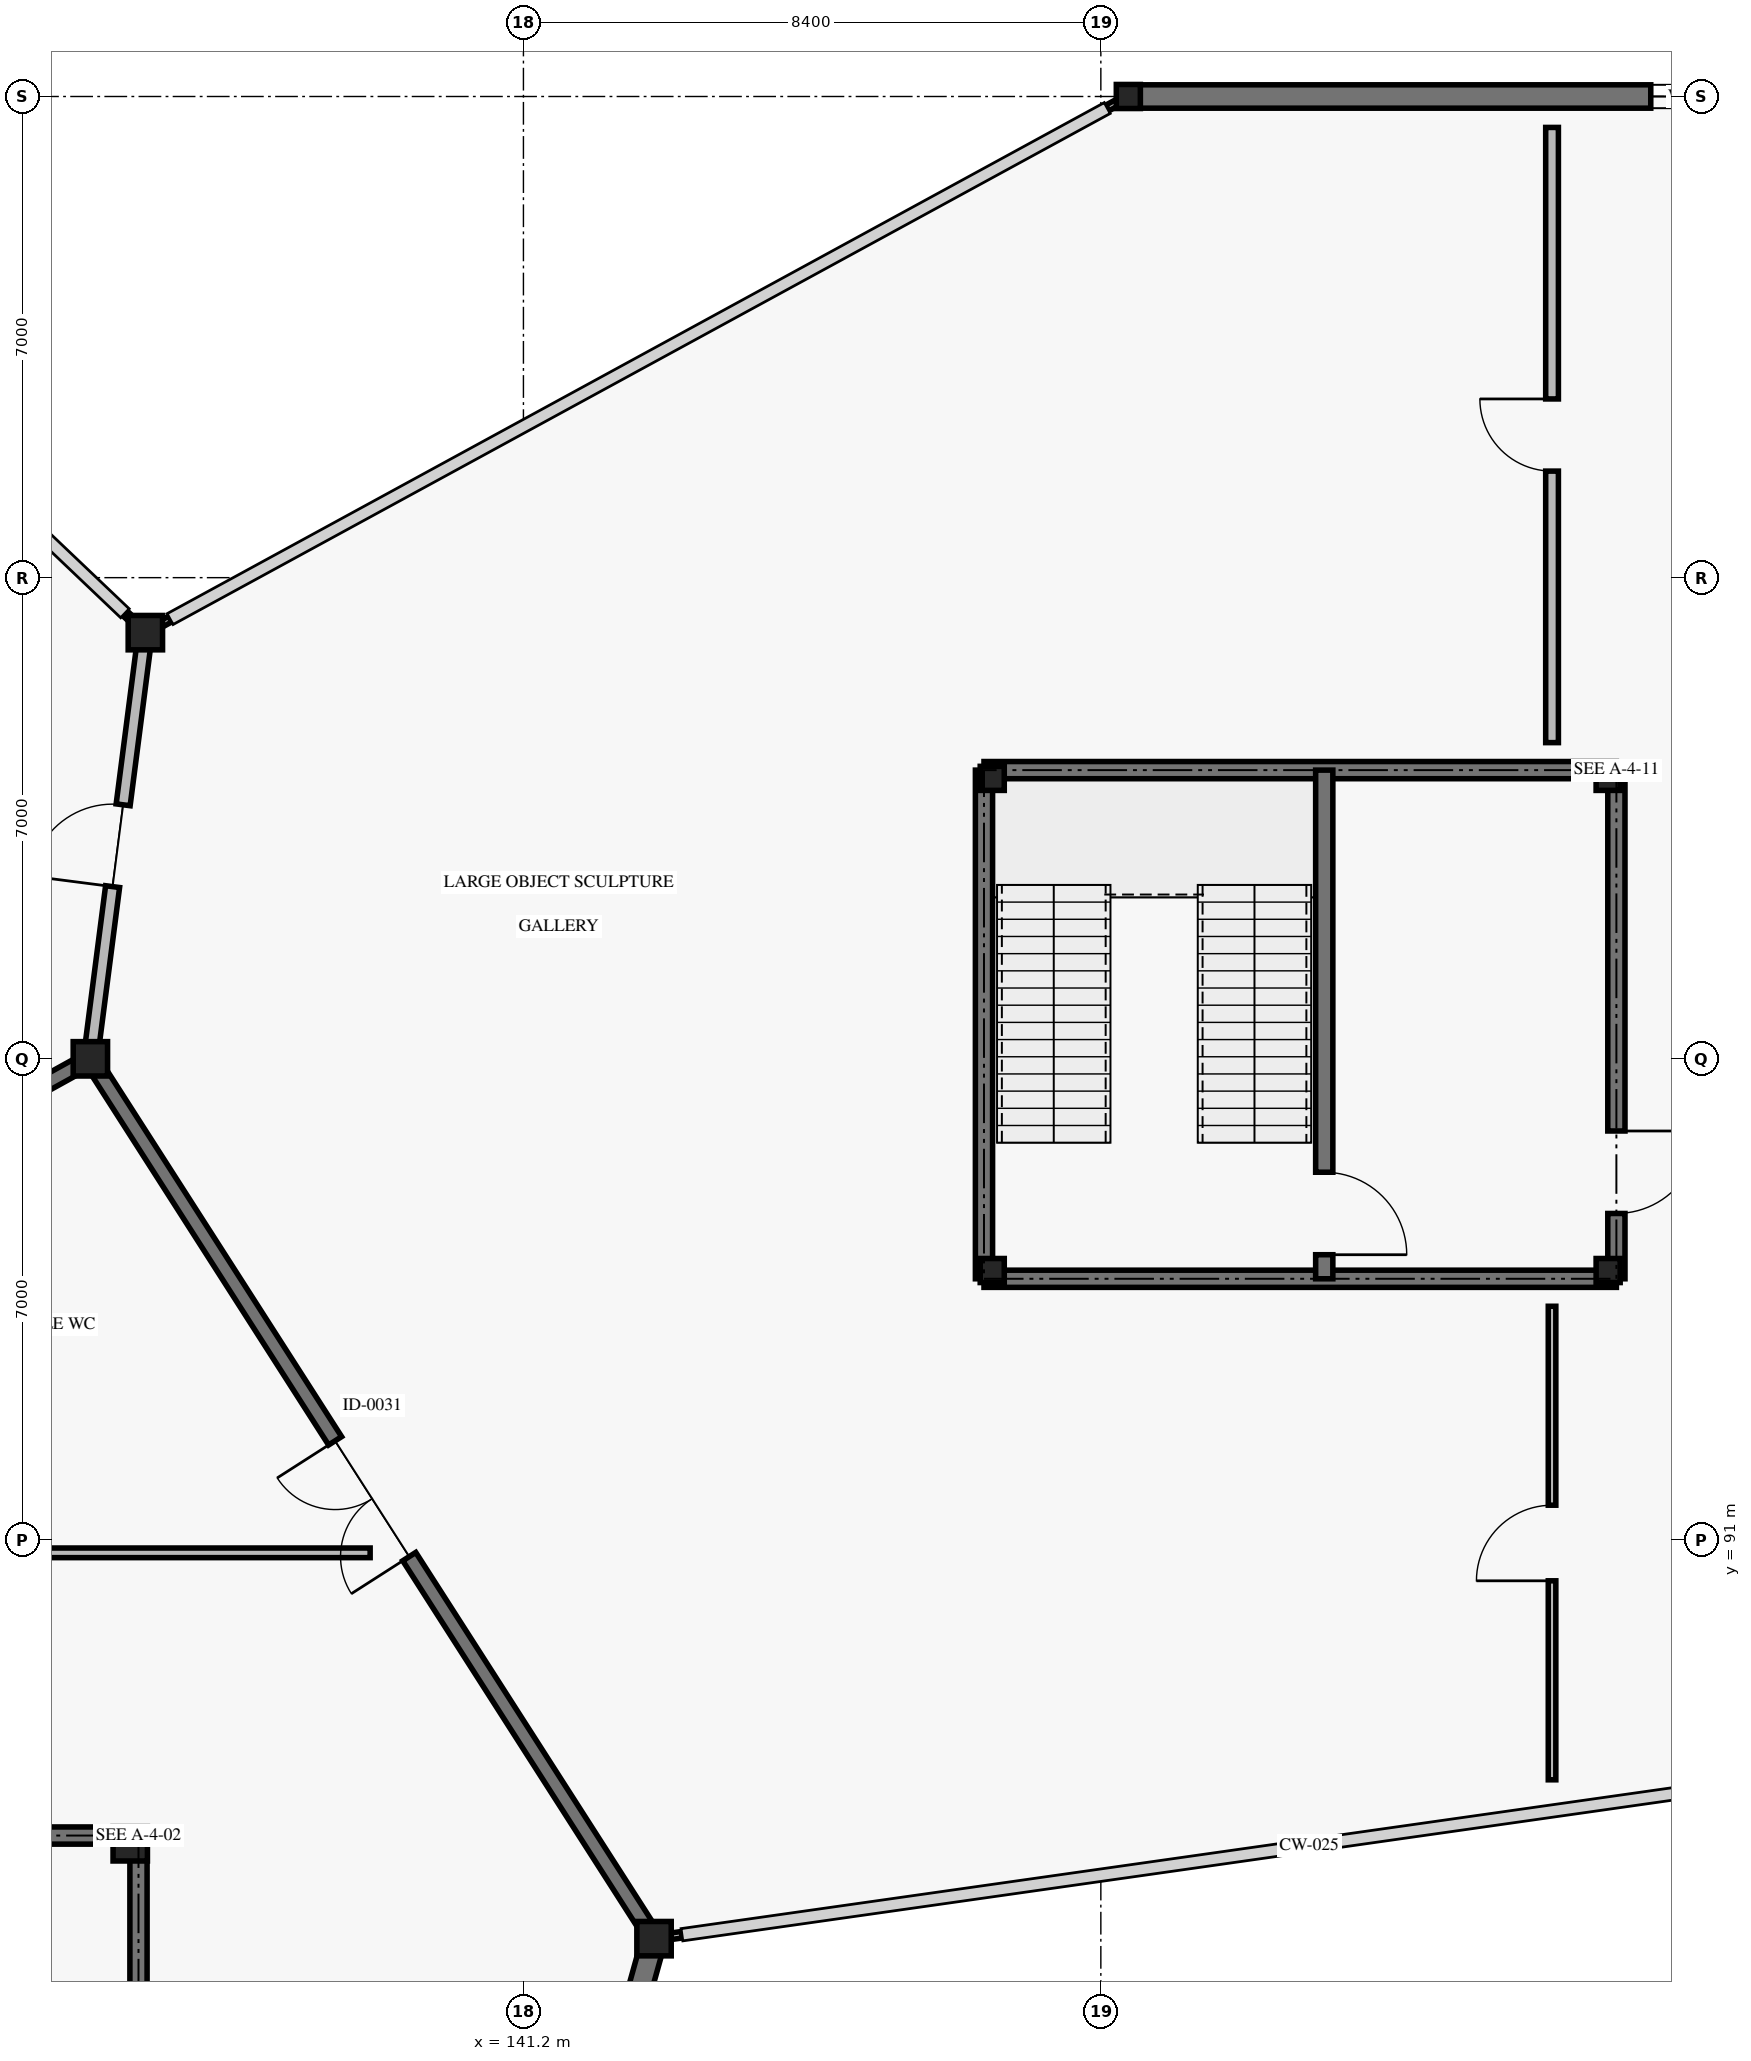
"""IFC4 building model, lengths in metres.
Left out: names, types, materials, properties, quantities, classifications, styles, units other than length and angle.
Written with IfcOpenShell. Run it as: python <this file> out.ifc"""

import sys

from ifc_helpers import new_model, si_unit, direction, frame, frame_2d, origin, origin_2d, place, context, subcontext, project, spatial, rectangle, i_section, extrude, element, fill, save


model = new_model("IFC4")
c1 = context("Model", 3, precision=1e-05, world=origin(), true_north=direction((0.0, 1.0)))
c2 = subcontext(c1, "Body", "Model", "MODEL_VIEW")
j1 = project(units=[si_unit("LENGTHUNIT", "METRE"), si_unit("PLANEANGLEUNIT", "RADIAN")], contexts=[c1])
p1 = place(None, origin())
s1 = spatial("IfcSite", under=j1, at=p1, CompositionType="ELEMENT")
p2 = place(p1, origin())
s2 = spatial("IfcBuilding", under=s1, at=p2, CompositionType="ELEMENT")
p3 = place(p2, origin())
s3 = spatial("IfcBuildingStorey", under=s2, at=p3, CompositionType="ELEMENT", Elevation=0.0)
for number, where, z_axis, x_axis in (
    (1, (134.9, 98.0, 0.0), (0.0, 0.0, 1.0), (1.0, 0.0, 0.0)),
    (2, (135.7, 104.2, 0.0), (0.0, 0.0, 1.0), (1.0, 0.0, 0.0)),
    (3, (143.1, 85.2, 0.0), (0.0, 0.0, 1.0), (1.0, 0.0, 0.0)),
):
    element("IfcColumn", number, at=place(p3, frame(where, z_axis=z_axis, x_axis=x_axis)), inside=s3, PredefinedType="COLUMN", context=c2, shape_type="SweptSolid", body=[
        extrude(i_section(OverallWidth=0.5, OverallDepth=0.5, WebThickness=0.022, FlangeThickness=0.036, at=origin_2d()), origin(), (0.0, 0.0, 1.0), 5.4),
    ])
p4 = place(p3, frame((150.0, 112.0, 0.0), z_axis=(0.0, 0.0, 1.0), x_axis=(1.0, 0.0, 0.0)))
e4 = element("IfcColumn", 4, at=p4, inside=s3, PredefinedType="COLUMN", context=c2, shape_type="SweptSolid", body=[
    extrude(i_section(OverallWidth=0.35, OverallDepth=0.35, WebThickness=0.02, FlangeThickness=0.028, at=origin_2d()), origin(), (0.0, 0.0, 1.0), 5.4),
])
p5 = place(p3, frame((135.48, 86.58, 0.0), z_axis=(0.0, 0.0, 1.0), x_axis=(1.0, 0.0, 0.0)))
e5 = element("IfcColumn", 5, at=p5, inside=s3, PredefinedType="COLUMN", context=c2, shape_type="SweptSolid", body=[
    extrude(i_section(OverallWidth=0.5, OverallDepth=0.5, WebThickness=0.022, FlangeThickness=0.036, at=origin_2d()), origin(), (0.0, 0.0, 1.0), 5.4),
])
for number, where, z_axis, x_axis in (
    (6, (148.02, 94.92, 0.0), (0.0, 0.0, 1.0), (1.0, 0.0, 0.0)),
    (7, (156.98, 94.92, 0.0), (0.0, 0.0, 1.0), (1.0, 0.0, 0.0)),
    (8, (156.98, 102.08, 0.0), (0.0, 0.0, 1.0), (1.0, 0.0, 0.0)),
    (9, (148.02, 102.08, 0.0), (0.0, 0.0, 1.0), (1.0, 0.0, 0.0)),
):
    element("IfcColumn", number, at=place(p3, frame(where, z_axis=z_axis, x_axis=x_axis)), inside=s3, PredefinedType="COLUMN", context=c2, shape_type="SweptSolid", body=[
        extrude(i_section(OverallWidth=0.35, OverallDepth=0.35, WebThickness=0.02, FlangeThickness=0.028, at=origin_2d()), origin(), (0.0, 0.0, 1.0), 5.4),
    ])
p6 = place(p3, frame((143.084, 85.142, 0.0), z_axis=(0.0, 0.0, 1.0), x_axis=(-0.268810029922, -0.963193214165, 0.0)))
e10 = element("IfcWall", 10, at=p6, inside=s3, PredefinedType="SOLIDWALL", context=c2, shape_type="SweptSolid", body=[
    extrude(rectangle(XDim=13.333, YDim=0.34, at=frame_2d((6.667, 0.0))), origin(), (0.0, 0.0, 1.0), 4.22),
])
p7 = place(p3, frame((135.403, 104.482, 0.0), z_axis=(0.0, 0.0, 1.0), x_axis=(0.726243974232, -0.687437044311, 0.0)))
e11 = element("IfcWall", 11, at=p7, inside=s3, PredefinedType="SOLIDWALL", context=c2, shape_type="SweptSolid", body=[
    extrude(rectangle(XDim=0.308, YDim=0.095, at=frame_2d((0.154, 0.0))), origin(), (0.0, 0.0, 1.0), 4.22),
])
p8 = place(p3, frame((143.506, 85.257, 0.0), z_axis=(0.0, 0.0, 1.0), x_axis=(-0.990232667812, -0.139424759628, 0.0)))
e12 = element("IfcWall", 12, at=p8, inside=s3, PredefinedType="SOLIDWALL", context=c2, shape_type="SweptSolid", body=[
    extrude(rectangle(XDim=0.308, YDim=0.095, at=frame_2d((0.154, 0.0))), origin(), (0.0, 0.0, 1.0), 4.22),
])
p9 = place(p3, frame((150.0, 112.0, 0.0), z_axis=(0.0, 0.0, 1.0), x_axis=(1.0, 0.0, 0.0)))
e13 = element("IfcWall", 13, at=p9, inside=s3, PredefinedType="SOLIDWALL", context=c2, shape_type="SweptSolid", body=[
    extrude(rectangle(XDim=16.4, YDim=0.34, at=frame_2d((8.2, 0.0))), origin(), (0.0, 0.0, 1.0), 4.22),
])
p10 = place(p9, frame((7.6, 0.0, 0.95)))
e14 = element("IfcOpeningElement", 14, at=p10, cuts=e13, PredefinedType="OPENING", context=c2, shape_type="SweptSolid", body=[
    extrude(rectangle(XDim=1.2, YDim=1.8, at=frame_2d((0.6, 0.9))), frame((0.0, 0.18, 0.0), z_axis=(0.0, -1.0, 0.0), x_axis=(1.0, 0.0, 0.0)), (0.0, 0.0, 1.0), 0.36),
])
p11 = place(p3, frame((135.79, 104.249, 0.0), z_axis=(0.0, 0.0, 1.0), x_axis=(0.876984894636, 0.480517944077, 0.0)))
e15 = element("IfcWall", 15, at=p11, inside=s3, PredefinedType="SOLIDWALL", context=c2, shape_type="SweptSolid", body=[
    extrude(rectangle(XDim=0.308, YDim=0.095, at=frame_2d((0.154, 0.0))), origin(), (0.0, 0.0, 1.0), 4.22),
])
p12 = place(p3, frame((149.693, 111.832, 0.0), z_axis=(0.0, 0.0, 1.0), x_axis=(0.876801617046, 0.480852289529, 0.0)))
e16 = element("IfcWall", 16, at=p12, inside=s3, PredefinedType="SOLIDWALL", context=c2, shape_type="SweptSolid", body=[
    extrude(rectangle(XDim=0.308, YDim=0.095, at=frame_2d((0.154, 0.0))), origin(), (0.0, 0.0, 1.0), 4.22),
])
p13 = place(p3, frame((134.9, 98.0, 0.0), z_axis=(0.0, 0.0, 1.0), x_axis=(-0.875181353329, -0.483794996652, 0.0)))
e17 = element("IfcWall", 17, at=p13, inside=s3, PredefinedType="SOLIDWALL", context=c2, shape_type="SweptSolid", body=[
    extrude(rectangle(XDim=18.396, YDim=0.225, at=frame_2d((9.198, 0.0))), origin(), (0.0, 0.0, 1.0), 4.62),
])
p14 = place(p13, frame((8.098, 0.0, 0.0)))
e18 = element("IfcOpeningElement", 18, at=p14, cuts=e17, PredefinedType="OPENING", context=c2, shape_type="SweptSolid", body=[
    extrude(rectangle(XDim=2.2, YDim=2.6, at=frame_2d((1.1, 1.3))), frame((0.0, 0.123, 0.0), z_axis=(0.0, -1.0, 0.0), x_axis=(1.0, 0.0, 0.0)), (0.0, 0.0, 1.0), 0.245),
])
p15 = place(p3, frame((143.1, 85.2, 0.0), z_axis=(0.0, 0.0, 1.0), x_axis=(-0.539434641352, 0.842027474439, 0.0)))
e19 = element("IfcWall", 19, at=p15, inside=s3, PredefinedType="SOLIDWALL", context=c2, shape_type="SweptSolid", body=[
    extrude(rectangle(XDim=15.201, YDim=0.225, at=frame_2d((7.601, 0.0))), origin(), (0.0, 0.0, 1.0), 4.62),
])
p16 = place(p15, frame((6.601, 0.0, 0.0)))
e20 = element("IfcOpeningElement", 20, at=p16, cuts=e19, PredefinedType="OPENING", context=c2, shape_type="SweptSolid", body=[
    extrude(rectangle(XDim=2.0, YDim=2.5, at=frame_2d((1.0, 1.25))), frame((0.0, 0.123, 0.0), z_axis=(0.0, -1.0, 0.0), x_axis=(1.0, 0.0, 0.0)), (0.0, 0.0, 1.0), 0.245),
])
p17 = place(p3, frame((134.9, 98.0, 0.0), z_axis=(0.0, 0.0, 1.0), x_axis=(0.127980011854, 0.991776747341, 0.0)))
e21 = element("IfcWall", 21, at=p17, inside=s3, PredefinedType="SOLIDWALL", context=c2, shape_type="SweptSolid", body=[
    extrude(rectangle(XDim=6.251, YDim=0.205, at=frame_2d((3.126, 0.0))), origin(), (0.0, 0.0, 1.0), 3.92),
])
p18 = place(p17, frame((2.526, 0.0, 0.0)))
e22 = element("IfcOpeningElement", 22, at=p18, cuts=e21, PredefinedType="OPENING", context=c2, shape_type="SweptSolid", body=[
    extrude(rectangle(XDim=1.2, YDim=2.2, at=frame_2d((0.6, 1.1))), frame((0.0, 0.113, 0.0), z_axis=(0.0, -1.0, 0.0), x_axis=(1.0, 0.0, 0.0)), (0.0, 0.0, 1.0), 0.225),
])
p19 = place(p3, frame((122.829, 90.813, 0.0), z_axis=(0.0, 0.0, 1.0), x_axis=(1.0, 0.0, 0.0)))
e23 = element("IfcWall", 23, at=p19, inside=s3, PredefinedType="PARTITIONING", context=c2, shape_type="SweptSolid", body=[
    extrude(rectangle(XDim=16.141, YDim=0.14, at=frame_2d((8.07, 0.0))), origin(), (0.0, 0.0, 1.0), 3.92),
])
p20 = place(p19, frame((7.581, 0.0, 0.0)))
e24 = element("IfcOpeningElement", 24, at=p20, cuts=e23, PredefinedType="OPENING", context=c2, shape_type="SweptSolid", body=[
    extrude(rectangle(XDim=0.98, YDim=2.15, at=frame_2d((0.49, 1.075))), frame((0.0, 0.08, 0.0), z_axis=(0.0, -1.0, 0.0), x_axis=(1.0, 0.0, 0.0)), (0.0, 0.0, 1.0), 0.16),
])
p21 = place(p3, frame((156.164, 87.511, 0.0), z_axis=(0.0, 0.0, 1.0), x_axis=(0.0, 1.0, 0.0)))
e25 = element("IfcWall", 25, at=p21, inside=s3, PredefinedType="PARTITIONING", context=c2, shape_type="SweptSolid", body=[
    extrude(rectangle(XDim=6.889, YDim=0.11, at=frame_2d((3.444, 0.0))), origin(), (0.0, 0.0, 1.0), 3.92),
])
p22 = place(p21, frame((2.895, 0.0, 0.0)))
e26 = element("IfcOpeningElement", 26, at=p22, cuts=e25, PredefinedType="OPENING", context=c2, shape_type="SweptSolid", body=[
    extrude(rectangle(XDim=1.1, YDim=2.2, at=frame_2d((0.55, 1.1))), frame((0.0, 0.065, 0.0), z_axis=(0.0, -1.0, 0.0), x_axis=(1.0, 0.0, 0.0)), (0.0, 0.0, 1.0), 0.13),
])
p23 = place(p3, frame((156.164, 102.6, 0.0), z_axis=(0.0, 0.0, 1.0), x_axis=(0.0, 1.0, 0.0)))
e27 = element("IfcWall", 27, at=p23, inside=s3, PredefinedType="PARTITIONING", context=c2, shape_type="SweptSolid", body=[
    extrude(rectangle(XDim=8.95, YDim=0.185, at=frame_2d((4.475, 0.0))), origin(), (0.0, 0.0, 1.0), 3.92),
])
p24 = place(p23, frame((3.95, 0.0, 0.0)))
e28 = element("IfcOpeningElement", 28, at=p24, cuts=e27, PredefinedType="OPENING", context=c2, shape_type="SweptSolid", body=[
    extrude(rectangle(XDim=1.05, YDim=2.2, at=frame_2d((0.525, 1.1))), frame((0.0, 0.103, 0.0), z_axis=(0.0, -1.0, 0.0), x_axis=(1.0, 0.0, 0.0)), (0.0, 0.0, 1.0), 0.205),
])
p25 = place(p3, frame((126.4, 86.7, 0.0), z_axis=(0.0, 0.0, 1.0), x_axis=(1.0, 0.0, 0.0)))
e29 = element("IfcWall", 29, at=p25, inside=s3, PredefinedType="SHEAR", context=c2, shape_type="SweptSolid", body=[
    extrude(rectangle(XDim=9.2, YDim=0.25, at=frame_2d((4.6, 0.0))), origin(), (0.0, 0.0, 1.0), 5.16),
])
p26 = place(p3, frame((135.6, 86.7, 0.0), z_axis=(0.0, 0.0, 1.0), x_axis=(0.0, -1.0, 0.0)))
e30 = element("IfcWall", 30, at=p26, inside=s3, PredefinedType="SHEAR", context=c2, shape_type="SweptSolid", body=[
    extrude(rectangle(XDim=7.4, YDim=0.25, at=frame_2d((3.7, 0.0))), origin(), (0.0, 0.0, 1.0), 5.16),
])
p27 = place(p26, frame((5.25, 0.0, 0.0)))
e31 = element("IfcOpeningElement", 31, at=p27, cuts=e30, PredefinedType="OPENING", context=c2, shape_type="SweptSolid", body=[
    extrude(rectangle(XDim=1.2, YDim=2.2, at=frame_2d((0.6, 1.1))), frame((0.0, 0.135, 0.0), z_axis=(0.0, -1.0, 0.0), x_axis=(1.0, 0.0, 0.0)), (0.0, 0.0, 1.0), 0.27),
])
p28 = place(p3, frame((147.9, 94.8, 0.0), z_axis=(0.0, 0.0, 1.0), x_axis=(0.0, 1.0, 0.0)))
e32 = element("IfcWall", 32, at=p28, inside=s3, PredefinedType="SHEAR", context=c2, shape_type="SweptSolid", body=[
    extrude(rectangle(XDim=7.4, YDim=0.25, at=frame_2d((3.7, 0.0))), origin(), (0.0, 0.0, 1.0), 5.16),
])
for number, where, z_axis, x_axis in (
    (33, (147.9, 102.2, 0.0), (0.0, 0.0, 1.0), (1.0, 0.0, 0.0)),
    (34, (157.1, 94.8, 0.0), (0.0, 0.0, 1.0), (-1.0, 0.0, 0.0)),
):
    element("IfcWall", number, at=place(p3, frame(where, z_axis=z_axis, x_axis=x_axis)), inside=s3, PredefinedType="SHEAR", context=c2, shape_type="SweptSolid", body=[
        extrude(rectangle(XDim=9.2, YDim=0.25, at=frame_2d((4.6, 0.0))), origin(), (0.0, 0.0, 1.0), 5.16),
    ])
p29 = place(p3, frame((157.1, 102.2, 0.0), z_axis=(0.0, 0.0, 1.0), x_axis=(0.0, -1.0, 0.0)))
e35 = element("IfcWall", 35, at=p29, inside=s3, PredefinedType="SHEAR", context=c2, shape_type="SweptSolid", body=[
    extrude(rectangle(XDim=7.4, YDim=0.25, at=frame_2d((3.7, 0.0))), origin(), (0.0, 0.0, 1.0), 5.16),
])
p30 = place(p29, frame((5.25, 0.0, 0.0)))
e36 = element("IfcOpeningElement", 36, at=p30, cuts=e35, PredefinedType="OPENING", context=c2, shape_type="SweptSolid", body=[
    extrude(rectangle(XDim=1.2, YDim=2.2, at=frame_2d((0.6, 1.1))), frame((0.0, 0.135, 0.0), z_axis=(0.0, -1.0, 0.0), x_axis=(1.0, 0.0, 0.0)), (0.0, 0.0, 1.0), 0.27),
])
p31 = place(p3, frame((152.85, 102.2, 0.0), z_axis=(0.0, 0.0, 1.0), x_axis=(0.0, -1.0, 0.0)))
e37 = element("IfcWall", 37, at=p31, inside=s3, PredefinedType="SHEAR", context=c2, shape_type="SweptSolid", body=[
    extrude(rectangle(XDim=7.4, YDim=0.25, at=frame_2d((3.7, 0.0))), origin(), (0.0, 0.0, 1.0), 5.16),
])
p32 = place(p31, frame((5.85, 0.0, 0.0)))
e38 = element("IfcOpeningElement", 38, at=p32, cuts=e37, PredefinedType="OPENING", context=c2, shape_type="SweptSolid", body=[
    extrude(rectangle(XDim=1.2, YDim=2.2, at=frame_2d((0.6, 1.1))), frame((0.0, 0.135, 0.0), z_axis=(0.0, -1.0, 0.0), x_axis=(1.0, 0.0, 0.0)), (0.0, 0.0, 1.0), 0.27),
])
p33 = place(p10, origin())
e39 = element("IfcWindow", 39, at=p33, inside=s3, PartitioningType="SINGLE_PANEL", PredefinedType="WINDOW", context=c2, shape_type="SweptSolid", body=[
    extrude(rectangle(XDim=1.2, YDim=1.8, at=frame_2d((0.6, 0.9))), frame((0.0, 0.03, 0.0), z_axis=(0.0, -1.0, 0.0), x_axis=(1.0, 0.0, 0.0)), (0.0, 0.0, 1.0), 0.06),
])
fill(e14, e39)
p34 = place(p16, origin())
e40 = element("IfcDoor", 40, at=p34, inside=s3, OperationType="DOUBLE_DOOR_SINGLE_SWING", PredefinedType="DOOR", context=c2, shape_type="SweptSolid", body=[
    extrude(rectangle(XDim=2.0, YDim=2.5, at=frame_2d((1.0, 1.25))), frame((0.0, 0.025, 0.0), z_axis=(0.0, -1.0, 0.0), x_axis=(1.0, 0.0, 0.0)), (0.0, 0.0, 1.0), 0.05),
])
fill(e20, e40)
p35 = place(p18, origin())
e41 = element("IfcDoor", 41, at=p35, inside=s3, OperationType="SINGLE_SWING_LEFT", PredefinedType="DOOR", context=c2, shape_type="SweptSolid", body=[
    extrude(rectangle(XDim=1.2, YDim=2.2, at=frame_2d((0.6, 1.1))), frame((0.0, 0.025, 0.0), z_axis=(0.0, -1.0, 0.0), x_axis=(1.0, 0.0, 0.0)), (0.0, 0.0, 1.0), 0.05),
])
fill(e22, e41)
p36 = place(p22, origin())
e42 = element("IfcDoor", 42, at=p36, inside=s3, OperationType="SINGLE_SWING_LEFT", PredefinedType="DOOR", context=c2, shape_type="SweptSolid", body=[
    extrude(rectangle(XDim=1.1, YDim=2.2, at=frame_2d((0.55, 1.1))), frame((0.0, 0.025, 0.0), z_axis=(0.0, -1.0, 0.0), x_axis=(1.0, 0.0, 0.0)), (0.0, 0.0, 1.0), 0.05),
])
fill(e26, e42)
p37 = place(p24, origin())
e43 = element("IfcDoor", 43, at=p37, inside=s3, OperationType="SINGLE_SWING_RIGHT", PredefinedType="DOOR", context=c2, shape_type="SweptSolid", body=[
    extrude(rectangle(XDim=1.05, YDim=2.2, at=frame_2d((0.525, 1.1))), frame((0.0, 0.025, 0.0), z_axis=(0.0, -1.0, 0.0), x_axis=(1.0, 0.0, 0.0)), (0.0, 0.0, 1.0), 0.05),
])
fill(e28, e43)
p38 = place(p30, origin())
e44 = element("IfcDoor", 44, at=p38, inside=s3, OperationType="SINGLE_SWING_LEFT", PredefinedType="DOOR", context=c2, shape_type="SweptSolid", body=[
    extrude(rectangle(XDim=1.2, YDim=2.2, at=frame_2d((0.6, 1.1))), frame((0.0, 0.025, 0.0), z_axis=(0.0, -1.0, 0.0), x_axis=(1.0, 0.0, 0.0)), (0.0, 0.0, 1.0), 0.05),
])
fill(e36, e44)
p39 = place(p32, origin())
e45 = element("IfcDoor", 45, at=p39, inside=s3, OperationType="SINGLE_SWING_RIGHT", PredefinedType="DOOR", context=c2, shape_type="SweptSolid", body=[
    extrude(rectangle(XDim=1.2, YDim=2.2, at=frame_2d((0.6, 1.1))), frame((0.0, 0.025, 0.0), z_axis=(0.0, -1.0, 0.0), x_axis=(1.0, 0.0, 0.0)), (0.0, 0.0, 1.0), 0.05),
])
fill(e38, e45)
save(model, sys.argv[1])
